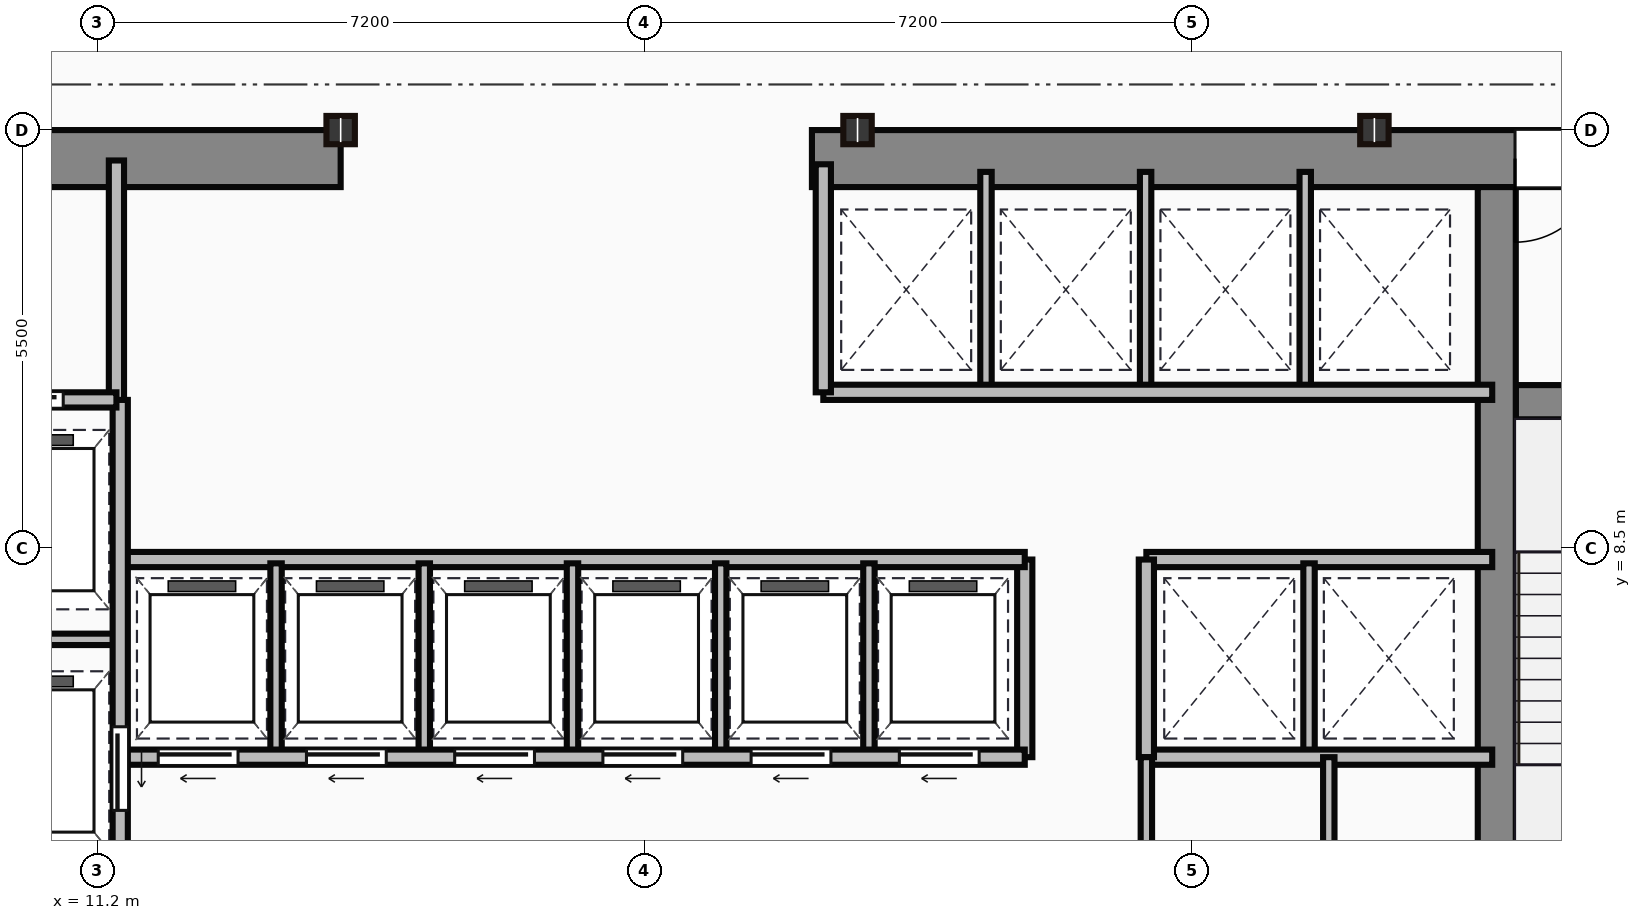
"""IFC4 building model, lengths in metres.
Left out: names, types, materials, properties, quantities, classifications, styles, units other than length and angle.
Written with IfcOpenShell. Run it as: python <this file> out.ifc"""

import sys

from ifc_helpers import new_model, si_unit, direction, frame, frame_2d, origin, origin_2d, place, context, subcontext, project, spatial, rectangle, i_section, extrude, source, transform, mapped, element, fill, save


model = new_model("IFC4")
c1 = context("Model", 3, precision=1e-05, world=origin(), true_north=direction((0.0, 1.0)))
c2 = subcontext(c1, "Body", "Model", "MODEL_VIEW")
j1 = project(units=[si_unit("LENGTHUNIT", "METRE"), si_unit("PLANEANGLEUNIT", "RADIAN")], contexts=[c1])
p1 = place(None, origin())
s1 = spatial("IfcSite", under=j1, at=p1, CompositionType="ELEMENT")
p2 = place(p1, origin())
s2 = spatial("IfcBuilding", under=s1, at=p2, CompositionType="ELEMENT")
p3 = place(p2, frame((0.0, 0.0, 147.9)))
s3 = spatial("IfcBuildingStorey", under=s2, at=p3, CompositionType="ELEMENT", Elevation=147.9)
m1 = source(origin(), c2, "Body", "SweptSolid", [
    extrude(rectangle(XDim=9.1, YDim=0.75, at=frame_2d((4.55, 0.0))), origin(), (0.0, 0.0, 1.0), 3.65),
])
p4 = place(p3, frame((5.3, 13.625, 0.0), z_axis=(0.0, 0.0, 1.0), x_axis=(1.0, 0.0, 0.0)))
e1 = element("IfcWall", 1, at=p4, inside=s3, PredefinedType="SHEAR", context=c2, shape_type="MappedRepresentation", body=[
    mapped(m1, transform((0.0, 0.0, 0.0))),
])
p5 = place(p4, frame((4.1, 0.0, 0.0)))
e2 = element("IfcOpeningElement", 2, at=p5, cuts=e1, PredefinedType="OPENING", context=c2, shape_type="SweptSolid", body=[
    extrude(rectangle(XDim=1.1, YDim=2.15, at=frame_2d((0.55, 1.075))), frame((0.0, 0.385, 0.0), z_axis=(0.0, -1.0, 0.0), x_axis=(1.0, 0.0, 0.0)), (0.0, 0.0, 1.0), 0.77),
])
m2 = source(origin(), c2, "Body", "SweptSolid", [
    extrude(rectangle(XDim=12.6, YDim=0.75, at=frame_2d((6.3, 0.0))), origin(), (0.0, 0.0, 1.0), 3.65),
])
p6 = place(p3, frame((20.6, 13.625, 0.0), z_axis=(0.0, 0.0, 1.0), x_axis=(1.0, 0.0, 0.0)))
e3 = element("IfcWall", 3, at=p6, inside=s3, PredefinedType="SHEAR", context=c2, shape_type="MappedRepresentation", body=[
    mapped(m2, transform((0.0, 0.0, 0.0))),
])
p7 = place(p6, frame((9.25, 0.0, 0.0)))
e4 = element("IfcOpeningElement", 4, at=p7, cuts=e3, PredefinedType="OPENING", context=c2, shape_type="SweptSolid", body=[
    extrude(rectangle(XDim=1.1, YDim=2.15, at=frame_2d((0.55, 1.075))), frame((0.0, 0.385, 0.0), z_axis=(0.0, -1.0, 0.0), x_axis=(1.0, 0.0, 0.0)), (0.0, 0.0, 1.0), 0.77),
])
m3 = source(origin(), c2, "Body", "SweptSolid", [
    extrude(rectangle(XDim=12.35, YDim=0.5, at=frame_2d((6.175, 0.0))), origin(), (0.0, 0.0, 1.0), 3.65),
])
p8 = place(p3, frame((29.61, 0.9, 0.0), z_axis=(0.0, 0.0, 1.0), x_axis=(0.0, 1.0, 0.0)))
e5 = element("IfcWall", 5, at=p8, inside=s3, PredefinedType="SHEAR", context=c2, shape_type="MappedRepresentation", body=[
    mapped(m3, transform((0.0, 0.0, 0.0))),
])
m4 = source(origin(), c2, "Body", "SweptSolid", [
    extrude(rectangle(XDim=3.39, YDim=0.45, at=frame_2d((1.695, 0.0))), origin(), (0.0, 0.0, 1.0), 3.65),
])
p9 = place(p3, frame((29.86, 10.42, 0.0), z_axis=(0.0, 0.0, 1.0), x_axis=(1.0, 0.0, 0.0)))
e6 = element("IfcWall", 6, at=p9, inside=s3, PredefinedType="SHEAR", context=c2, shape_type="MappedRepresentation", body=[
    mapped(m4, transform((0.0, 0.0, 0.0))),
])
p10 = place(p9, frame((1.1, 0.0, 0.0)))
e7 = element("IfcOpeningElement", 7, at=p10, cuts=e6, PredefinedType="OPENING", context=c2, shape_type="SweptSolid", body=[
    extrude(rectangle(XDim=1.1, YDim=2.15, at=frame_2d((0.55, 1.075))), frame((0.0, 0.235, 0.0), z_axis=(0.0, -1.0, 0.0), x_axis=(1.0, 0.0, 0.0)), (0.0, 0.0, 1.0), 0.47),
])
m5 = source(origin(), c2, "Body", "SweptSolid", [
    extrude(i_section(OverallWidth=0.374, OverallDepth=0.372, WebThickness=0.016, FlangeThickness=0.026, at=origin_2d()), origin(), (0.0, 0.0, 1.0), 3.65),
])
for number, where, z_axis, x_axis in (
    (8, (14.4, 14.0, 0.0), (0.0, 0.0, 1.0), (1.0, 0.0, 0.0)),
    (9, (21.2, 14.0, 0.0), (0.0, 0.0, 1.0), (1.0, 0.0, 0.0)),
    (10, (28.0, 14.0, 0.0), (0.0, 0.0, 1.0), (1.0, 0.0, 0.0)),
):
    element("IfcColumn", number, at=place(p3, frame(where, z_axis=z_axis, x_axis=x_axis)), inside=s3, PredefinedType="COLUMN", context=c2, shape_type="MappedRepresentation", body=[
        mapped(m5, transform((0.0, 0.0, 0.0))),
    ])
m6 = source(origin(), c2, "Body", "SweptSolid", [
    extrude(rectangle(XDim=3.18, YDim=0.2, at=frame_2d((1.59, 0.0))), origin(), (0.0, 0.0, 1.0), 3.4),
])
p11 = place(p3, frame((11.45, 10.42, 0.0), z_axis=(0.0, 0.0, 1.0), x_axis=(0.0, 1.0, 0.0)))
e11 = element("IfcWall", 11, at=p11, inside=s3, PredefinedType="PARTITIONING", context=c2, shape_type="MappedRepresentation", body=[
    mapped(m6, transform((0.0, 0.0, 0.0))),
])
m7 = source(origin(), c2, "Body", "SweptSolid", [
    extrude(rectangle(XDim=2.35, YDim=0.2, at=frame_2d((1.175, 0.0))), origin(), (0.0, 0.0, 1.0), 3.4),
])
p12 = place(p3, frame((9.1, 10.45, 0.0), z_axis=(0.0, 0.0, 1.0), x_axis=(1.0, 0.0, 0.0)))
e12 = element("IfcWall", 12, at=p12, inside=s3, PredefinedType="PARTITIONING", context=c2, shape_type="MappedRepresentation", body=[
    mapped(m7, transform((0.0, 0.0, 0.0))),
])
p13 = place(p12, frame((0.55, 0.0, 0.0)))
e13 = element("IfcOpeningElement", 13, at=p13, cuts=e12, PredefinedType="OPENING", context=c2, shape_type="SweptSolid", body=[
    extrude(rectangle(XDim=1.1, YDim=2.15, at=frame_2d((0.55, 1.075))), frame((0.0, 0.11, 0.0), z_axis=(0.0, -1.0, 0.0), x_axis=(1.0, 0.0, 0.0)), (0.0, 0.0, 1.0), 0.22),
])
m8 = source(origin(), c2, "Body", "SweptSolid", [
    extrude(rectangle(XDim=9.6, YDim=0.2, at=frame_2d((4.8, 0.0))), origin(), (0.0, 0.0, 1.0), 3.4),
])
p14 = place(p3, frame((11.5, 0.85, 0.0), z_axis=(0.0, 0.0, 1.0), x_axis=(0.0, 1.0, 0.0)))
e14 = element("IfcWall", 14, at=p14, inside=s3, PredefinedType="PARTITIONING", context=c2, shape_type="MappedRepresentation", body=[
    mapped(m8, transform((0.0, 0.0, 0.0))),
])
p15 = place(p14, frame((4.2, 0.0, 0.0)))
e15 = element("IfcOpeningElement", 15, at=p15, cuts=e14, PredefinedType="OPENING", context=c2, shape_type="SweptSolid", body=[
    extrude(rectangle(XDim=1.1, YDim=2.15, at=frame_2d((0.55, 1.075))), frame((0.0, 0.11, 0.0), z_axis=(0.0, -1.0, 0.0), x_axis=(1.0, 0.0, 0.0)), (0.0, 0.0, 1.0), 0.22),
])
p16 = place(p14, frame((0.9, 0.0, 0.0)))
e16 = element("IfcOpeningElement", 16, at=p16, cuts=e14, PredefinedType="OPENING", context=c2, shape_type="SweptSolid", body=[
    extrude(rectangle(XDim=1.2, YDim=2.15, at=frame_2d((0.6, 1.075))), frame((0.0, 0.11, 0.0), z_axis=(0.0, -1.0, 0.0), x_axis=(1.0, 0.0, 0.0)), (0.0, 0.0, 1.0), 0.22),
])
m9 = source(origin(), c2, "Body", "SweptSolid", [
    extrude(rectangle(XDim=2.4, YDim=0.15, at=frame_2d((1.2, 0.0))), origin(), (0.0, 0.0, 1.0), 3.4),
])
p17 = place(p3, frame((9.1, 7.3, 0.0), z_axis=(0.0, 0.0, 1.0), x_axis=(1.0, 0.0, 0.0)))
e17 = element("IfcWall", 17, at=p17, inside=s3, PredefinedType="PARTITIONING", context=c2, shape_type="MappedRepresentation", body=[
    mapped(m9, transform((0.0, 0.0, 0.0))),
])
m10 = source(origin(), c2, "Body", "SweptSolid", [
    extrude(rectangle(XDim=11.85, YDim=0.2, at=frame_2d((5.925, 0.0))), origin(), (0.0, 0.0, 1.0), 3.4),
])
p18 = place(p3, frame((11.55, 5.75, 0.0), z_axis=(0.0, 0.0, 1.0), x_axis=(1.0, 0.0, 0.0)))
e18 = element("IfcWall", 18, at=p18, inside=s3, PredefinedType="PARTITIONING", context=c2, shape_type="MappedRepresentation", body=[
    mapped(m10, transform((0.0, 0.0, 0.0))),
])
p19 = place(p18, frame((0.45, 0.0, 0.0)))
e19 = element("IfcOpeningElement", 19, at=p19, cuts=e18, PredefinedType="OPENING", context=c2, shape_type="SweptSolid", body=[
    extrude(rectangle(XDim=1.05, YDim=2.15, at=frame_2d((0.525, 1.075))), frame((0.0, 0.11, 0.0), z_axis=(0.0, -1.0, 0.0), x_axis=(1.0, 0.0, 0.0)), (0.0, 0.0, 1.0), 0.22),
])
p20 = place(p18, frame((2.4, 0.0, 0.0)))
e20 = element("IfcOpeningElement", 20, at=p20, cuts=e18, PredefinedType="OPENING", context=c2, shape_type="SweptSolid", body=[
    extrude(rectangle(XDim=1.05, YDim=2.15, at=frame_2d((0.525, 1.075))), frame((0.0, 0.11, 0.0), z_axis=(0.0, -1.0, 0.0), x_axis=(1.0, 0.0, 0.0)), (0.0, 0.0, 1.0), 0.22),
])
p21 = place(p18, frame((4.35, 0.0, 0.0)))
e21 = element("IfcOpeningElement", 21, at=p21, cuts=e18, PredefinedType="OPENING", context=c2, shape_type="SweptSolid", body=[
    extrude(rectangle(XDim=1.05, YDim=2.15, at=frame_2d((0.525, 1.075))), frame((0.0, 0.11, 0.0), z_axis=(0.0, -1.0, 0.0), x_axis=(1.0, 0.0, 0.0)), (0.0, 0.0, 1.0), 0.22),
])
p22 = place(p18, frame((6.3, 0.0, 0.0)))
e22 = element("IfcOpeningElement", 22, at=p22, cuts=e18, PredefinedType="OPENING", context=c2, shape_type="SweptSolid", body=[
    extrude(rectangle(XDim=1.05, YDim=2.15, at=frame_2d((0.525, 1.075))), frame((0.0, 0.11, 0.0), z_axis=(0.0, -1.0, 0.0), x_axis=(1.0, 0.0, 0.0)), (0.0, 0.0, 1.0), 0.22),
])
p23 = place(p18, frame((8.25, 0.0, 0.0)))
e23 = element("IfcOpeningElement", 23, at=p23, cuts=e18, PredefinedType="OPENING", context=c2, shape_type="SweptSolid", body=[
    extrude(rectangle(XDim=1.05, YDim=2.15, at=frame_2d((0.525, 1.075))), frame((0.0, 0.11, 0.0), z_axis=(0.0, -1.0, 0.0), x_axis=(1.0, 0.0, 0.0)), (0.0, 0.0, 1.0), 0.22),
])
p24 = place(p18, frame((10.2, 0.0, 0.0)))
e24 = element("IfcOpeningElement", 24, at=p24, cuts=e18, PredefinedType="OPENING", context=c2, shape_type="SweptSolid", body=[
    extrude(rectangle(XDim=1.05, YDim=2.15, at=frame_2d((0.525, 1.075))), frame((0.0, 0.11, 0.0), z_axis=(0.0, -1.0, 0.0), x_axis=(1.0, 0.0, 0.0)), (0.0, 0.0, 1.0), 0.22),
])
p25 = place(p3, frame((11.55, 8.35, 0.0), z_axis=(0.0, 0.0, 1.0), x_axis=(1.0, 0.0, 0.0)))
e25 = element("IfcWall", 25, at=p25, inside=s3, PredefinedType="PARTITIONING", context=c2, shape_type="MappedRepresentation", body=[
    mapped(m10, transform((0.0, 0.0, 0.0))),
])
m11 = source(origin(), c2, "Body", "SweptSolid", [
    extrude(rectangle(XDim=2.6, YDim=0.2, at=frame_2d((1.3, 0.0))), origin(), (0.0, 0.0, 1.0), 3.4),
])
p26 = place(p3, frame((23.4, 5.75, 0.0), z_axis=(0.0, 0.0, 1.0), x_axis=(0.0, 1.0, 0.0)))
e26 = element("IfcWall", 26, at=p26, inside=s3, PredefinedType="PARTITIONING", context=c2, shape_type="MappedRepresentation", body=[
    mapped(m11, transform((0.0, 0.0, 0.0))),
])
m12 = source(origin(), c2, "Body", "SweptSolid", [
    extrude(rectangle(XDim=2.5, YDim=0.15, at=frame_2d((1.25, 0.0))), origin(), (0.0, 0.0, 1.0), 3.4),
])
for number, where, z_axis, x_axis in (
    (27, (13.55, 5.8, 0.0), (0.0, 0.0, 1.0), (0.0, 1.0, 0.0)),
    (28, (15.5, 5.8, 0.0), (0.0, 0.0, 1.0), (0.0, 1.0, 0.0)),
    (29, (17.45, 5.8, 0.0), (0.0, 0.0, 1.0), (0.0, 1.0, 0.0)),
    (30, (19.4, 5.8, 0.0), (0.0, 0.0, 1.0), (0.0, 1.0, 0.0)),
    (31, (21.35, 5.8, 0.0), (0.0, 0.0, 1.0), (0.0, 1.0, 0.0)),
):
    element("IfcWall", number, at=place(p3, frame(where, z_axis=z_axis, x_axis=x_axis)), inside=s3, PredefinedType="PARTITIONING", context=c2, shape_type="MappedRepresentation", body=[
        mapped(m12, transform((0.0, 0.0, 0.0))),
    ])
m13 = source(origin(), c2, "Body", "SweptSolid", [
    extrude(rectangle(XDim=8.8, YDim=0.2, at=frame_2d((4.4, 0.0))), origin(), (0.0, 0.0, 1.0), 3.4),
])
p27 = place(p3, frame((20.75, 10.55, 0.0), z_axis=(0.0, 0.0, 1.0), x_axis=(1.0, 0.0, 0.0)))
e32 = element("IfcWall", 32, at=p27, inside=s3, PredefinedType="PARTITIONING", context=c2, shape_type="MappedRepresentation", body=[
    mapped(m13, transform((0.0, 0.0, 0.0))),
])
m14 = source(origin(), c2, "Body", "SweptSolid", [
    extrude(rectangle(XDim=3.0, YDim=0.2, at=frame_2d((1.5, 0.0))), origin(), (0.0, 0.0, 1.0), 3.4),
])
p28 = place(p3, frame((20.75, 10.55, 0.0), z_axis=(0.0, 0.0, 1.0), x_axis=(0.0, 1.0, 0.0)))
e33 = element("IfcWall", 33, at=p28, inside=s3, PredefinedType="PARTITIONING", context=c2, shape_type="MappedRepresentation", body=[
    mapped(m14, transform((0.0, 0.0, 0.0))),
])
m15 = source(origin(), c2, "Body", "SweptSolid", [
    extrude(rectangle(XDim=2.85, YDim=0.15, at=frame_2d((1.425, 0.0))), origin(), (0.0, 0.0, 1.0), 3.4),
])
for number, where, z_axis, x_axis in (
    (34, (22.89, 10.6, 0.0), (0.0, 0.0, 1.0), (0.0, 1.0, 0.0)),
    (35, (24.99, 10.6, 0.0), (0.0, 0.0, 1.0), (0.0, 1.0, 0.0)),
    (36, (27.09, 10.6, 0.0), (0.0, 0.0, 1.0), (0.0, 1.0, 0.0)),
):
    element("IfcWall", number, at=place(p3, frame(where, z_axis=z_axis, x_axis=x_axis)), inside=s3, PredefinedType="PARTITIONING", context=c2, shape_type="MappedRepresentation", body=[
        mapped(m15, transform((0.0, 0.0, 0.0))),
    ])
m16 = source(origin(), c2, "Body", "SweptSolid", [
    extrude(rectangle(XDim=4.55, YDim=0.2, at=frame_2d((2.275, 0.0))), origin(), (0.0, 0.0, 1.0), 3.4),
])
for number, where, z_axis, x_axis in (
    (37, (25.0, 8.35, 0.0), (0.0, 0.0, 1.0), (1.0, 0.0, 0.0)),
    (38, (25.0, 5.75, 0.0), (0.0, 0.0, 1.0), (1.0, 0.0, 0.0)),
):
    element("IfcWall", number, at=place(p3, frame(where, z_axis=z_axis, x_axis=x_axis)), inside=s3, PredefinedType="PARTITIONING", context=c2, shape_type="MappedRepresentation", body=[
        mapped(m16, transform((0.0, 0.0, 0.0))),
    ])
p29 = place(p3, frame((25.0, 5.75, 0.0), z_axis=(0.0, 0.0, 1.0), x_axis=(0.0, 1.0, 0.0)))
e39 = element("IfcWall", 39, at=p29, inside=s3, PredefinedType="PARTITIONING", context=c2, shape_type="MappedRepresentation", body=[
    mapped(m11, transform((0.0, 0.0, 0.0))),
])
p30 = place(p3, frame((27.14, 5.8, 0.0), z_axis=(0.0, 0.0, 1.0), x_axis=(0.0, 1.0, 0.0)))
e40 = element("IfcWall", 40, at=p30, inside=s3, PredefinedType="PARTITIONING", context=c2, shape_type="MappedRepresentation", body=[
    mapped(m12, transform((0.0, 0.0, 0.0))),
])
m17 = source(origin(), c2, "Body", "SweptSolid", [
    extrude(rectangle(XDim=4.9, YDim=0.15, at=frame_2d((2.45, 0.0))), origin(), (0.0, 0.0, 1.0), 3.4),
])
p31 = place(p3, frame((25.0, 0.85, 0.0), z_axis=(0.0, 0.0, 1.0), x_axis=(0.0, 1.0, 0.0)))
e41 = element("IfcWall", 41, at=p31, inside=s3, PredefinedType="PARTITIONING", context=c2, shape_type="MappedRepresentation", body=[
    mapped(m17, transform((0.0, 0.0, 0.0))),
])
p32 = place(p31, frame((2.5, 0.0, 0.0)))
e42 = element("IfcOpeningElement", 42, at=p32, cuts=e41, PredefinedType="OPENING", context=c2, shape_type="SweptSolid", body=[
    extrude(rectangle(XDim=0.95, YDim=2.15, at=frame_2d((0.475, 1.075))), frame((0.0, 0.085, 0.0), z_axis=(0.0, -1.0, 0.0), x_axis=(1.0, 0.0, 0.0)), (0.0, 0.0, 1.0), 0.17),
])
m18 = source(origin(), c2, "Body", "SweptSolid", [
    extrude(rectangle(XDim=3.4, YDim=0.15, at=frame_2d((1.7, 0.0))), origin(), (0.0, 0.0, 1.0), 3.4),
])
p33 = place(p3, frame((27.4, 2.35, 0.0), z_axis=(0.0, 0.0, 1.0), x_axis=(0.0, 1.0, 0.0)))
e43 = element("IfcWall", 43, at=p33, inside=s3, PredefinedType="PARTITIONING", context=c2, shape_type="MappedRepresentation", body=[
    mapped(m18, transform((0.0, 0.0, 0.0))),
])
p34 = place(p33, frame((1.1, 0.0, 0.0)))
e44 = element("IfcOpeningElement", 44, at=p34, cuts=e43, PredefinedType="OPENING", context=c2, shape_type="SweptSolid", body=[
    extrude(rectangle(XDim=0.85, YDim=2.1, at=frame_2d((0.425, 1.05))), frame((0.0, 0.085, 0.0), z_axis=(0.0, -1.0, 0.0), x_axis=(1.0, 0.0, 0.0)), (0.0, 0.0, 1.0), 0.17),
])
m19 = source(origin(), c2, "Body", "SweptSolid", [
    extrude(rectangle(XDim=1.1, YDim=2.15, at=frame_2d((0.55, 1.075))), frame((0.0, 0.025, 0.0), z_axis=(0.0, -1.0, 0.0), x_axis=(1.0, 0.0, 0.0)), (0.0, 0.0, 1.0), 0.05),
])
p35 = place(p7, origin())
e45 = element("IfcDoor", 45, at=p35, inside=s3, OperationType="SINGLE_SWING_LEFT", PredefinedType="DOOR", context=c2, shape_type="MappedRepresentation", body=[
    mapped(m19, transform((0.0, 0.0, 0.0))),
])
fill(e4, e45)
p36 = place(p13, origin())
e46 = element("IfcDoor", 46, at=p36, inside=s3, OperationType="SLIDING_TO_LEFT", PredefinedType="DOOR", context=c2, shape_type="MappedRepresentation", body=[
    mapped(m19, transform((0.0, 0.0, 0.0))),
])
fill(e13, e46)
p37 = place(p15, frame((1.1, 0.0, 0.0), z_axis=(0.0, 0.0, 1.0), x_axis=(-1.0, 0.0, 0.0)))
e47 = element("IfcDoor", 47, at=p37, inside=s3, OperationType="SLIDING_TO_LEFT", PredefinedType="DOOR", context=c2, shape_type="MappedRepresentation", body=[
    mapped(m19, transform((0.0, 0.0, 0.0))),
])
fill(e15, e47)
m20 = source(origin(), c2, "Body", "SweptSolid", [
    extrude(rectangle(XDim=1.05, YDim=2.15, at=frame_2d((0.525, 1.075))), frame((0.0, 0.025, 0.0), z_axis=(0.0, -1.0, 0.0), x_axis=(1.0, 0.0, 0.0)), (0.0, 0.0, 1.0), 0.05),
])
p38 = place(p19, frame((1.05, 0.0, 0.0), z_axis=(0.0, 0.0, 1.0), x_axis=(-1.0, 0.0, 0.0)))
e48 = element("IfcDoor", 48, at=p38, inside=s3, OperationType="SLIDING_TO_LEFT", PredefinedType="DOOR", context=c2, shape_type="MappedRepresentation", body=[
    mapped(m20, transform((0.0, 0.0, 0.0))),
])
fill(e19, e48)
p39 = place(p20, frame((1.05, 0.0, 0.0), z_axis=(0.0, 0.0, 1.0), x_axis=(-1.0, 0.0, 0.0)))
e49 = element("IfcDoor", 49, at=p39, inside=s3, OperationType="SLIDING_TO_LEFT", PredefinedType="DOOR", context=c2, shape_type="MappedRepresentation", body=[
    mapped(m20, transform((0.0, 0.0, 0.0))),
])
fill(e20, e49)
p40 = place(p21, frame((1.05, 0.0, 0.0), z_axis=(0.0, 0.0, 1.0), x_axis=(-1.0, 0.0, 0.0)))
e50 = element("IfcDoor", 50, at=p40, inside=s3, OperationType="SLIDING_TO_LEFT", PredefinedType="DOOR", context=c2, shape_type="MappedRepresentation", body=[
    mapped(m20, transform((0.0, 0.0, 0.0))),
])
fill(e21, e50)
p41 = place(p22, frame((1.05, 0.0, 0.0), z_axis=(0.0, 0.0, 1.0), x_axis=(-1.0, 0.0, 0.0)))
e51 = element("IfcDoor", 51, at=p41, inside=s3, OperationType="SLIDING_TO_LEFT", PredefinedType="DOOR", context=c2, shape_type="MappedRepresentation", body=[
    mapped(m20, transform((0.0, 0.0, 0.0))),
])
fill(e22, e51)
p42 = place(p23, frame((1.05, 0.0, 0.0), z_axis=(0.0, 0.0, 1.0), x_axis=(-1.0, 0.0, 0.0)))
e52 = element("IfcDoor", 52, at=p42, inside=s3, OperationType="SLIDING_TO_LEFT", PredefinedType="DOOR", context=c2, shape_type="MappedRepresentation", body=[
    mapped(m20, transform((0.0, 0.0, 0.0))),
])
fill(e23, e52)
p43 = place(p24, frame((1.05, 0.0, 0.0), z_axis=(0.0, 0.0, 1.0), x_axis=(-1.0, 0.0, 0.0)))
e53 = element("IfcDoor", 53, at=p43, inside=s3, OperationType="SLIDING_TO_LEFT", PredefinedType="DOOR", context=c2, shape_type="MappedRepresentation", body=[
    mapped(m20, transform((0.0, 0.0, 0.0))),
])
fill(e24, e53)
save(model, sys.argv[1])
